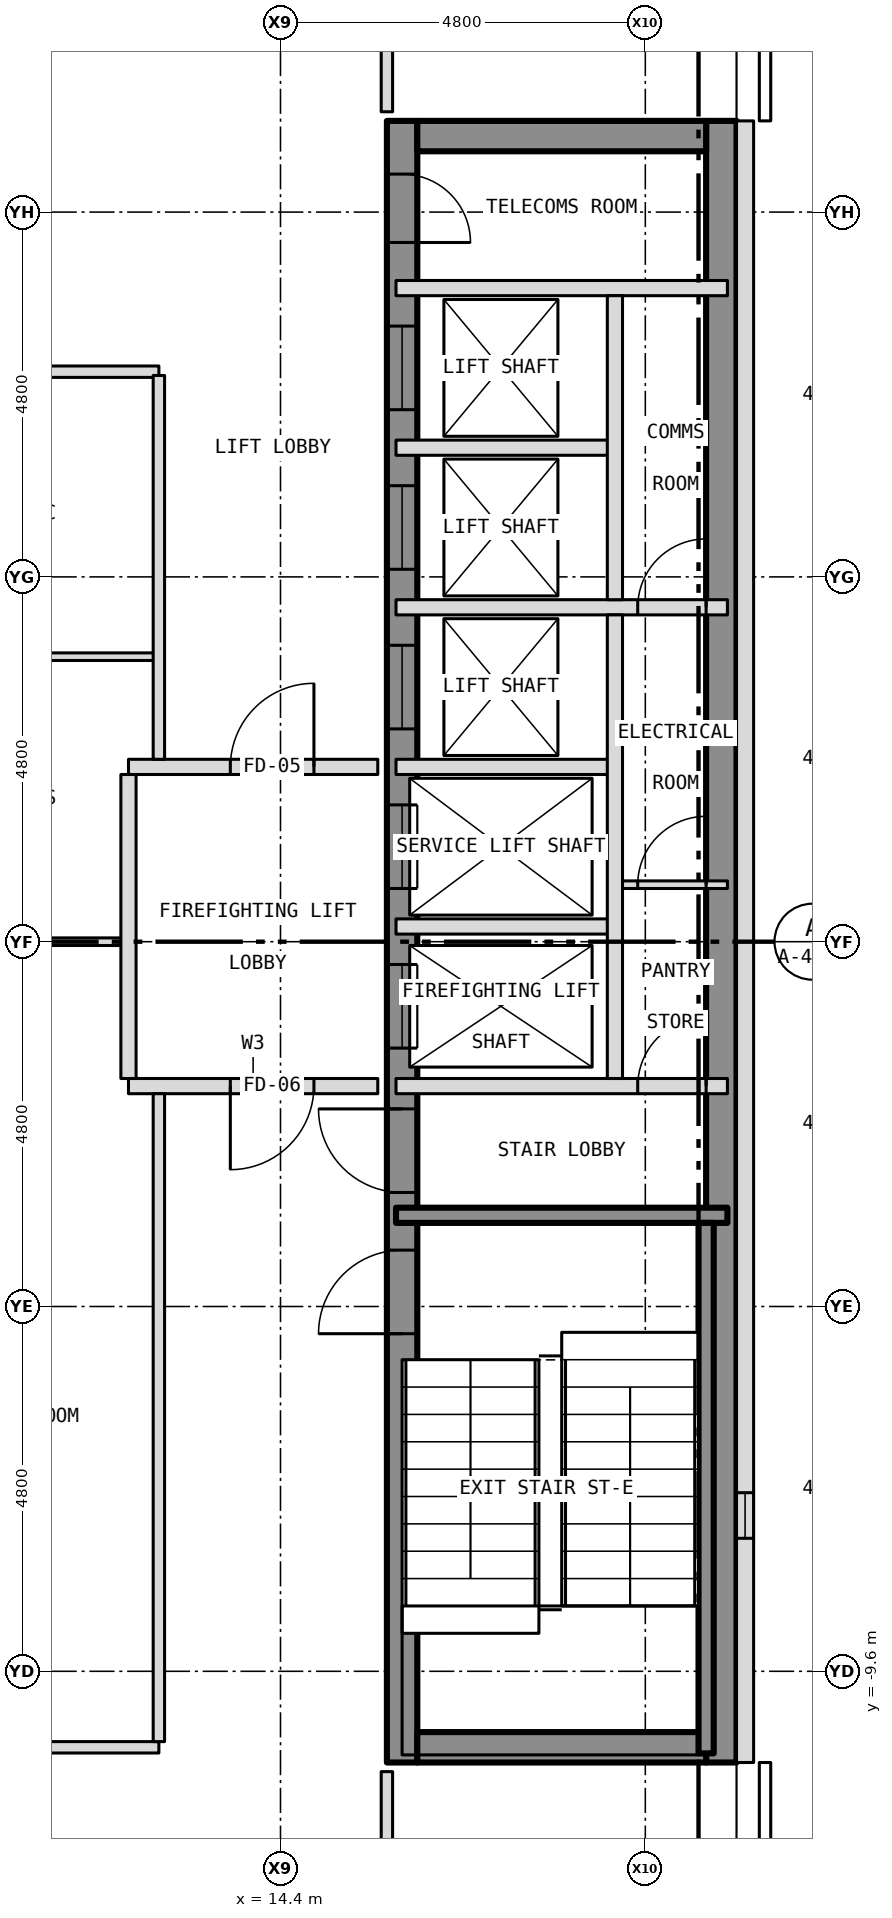
"""IFC4 building model, lengths in metres.
Left out: names, types, materials, properties, quantities, classifications, styles, units other than length and angle.
Written with IfcOpenShell. Run it as: python <this file> out.ifc"""

import sys

from ifc_helpers import new_model, si_unit, direction, frame, frame_2d, origin, place, context, subcontext, project, spatial, rectangle, extrude, element, fill, save


model = new_model("IFC4")
c1 = context("Model", 3, precision=1e-05, world=origin(), true_north=direction((0.0, 1.0)))
c2 = subcontext(c1, "Body", "Model", "MODEL_VIEW")
j1 = project(units=[si_unit("LENGTHUNIT", "METRE"), si_unit("PLANEANGLEUNIT", "RADIAN")], contexts=[c1])
p1 = place(None, origin())
s1 = spatial("IfcSite", under=j1, at=p1, CompositionType="ELEMENT")
p2 = place(p1, origin())
s2 = spatial("IfcBuilding", under=s1, at=p2, CompositionType="ELEMENT")
p3 = place(p2, frame((0.0, 0.0, 258.5)))
s3 = spatial("IfcBuildingStorey", under=s2, at=p3, CompositionType="ELEMENT", Elevation=258.5)
p4 = place(p3, frame((16.0, -10.8, 0.0), z_axis=(0.0, 0.0, 1.0), x_axis=(0.0, 1.0, 0.0)))
e1 = element("IfcWall", 1, at=p4, inside=s3, PredefinedType="SHEAR", context=c2, shape_type="SweptSolid", body=[
    extrude(rectangle(XDim=21.6, YDim=0.4, at=frame_2d((10.8, 0.0))), origin(), (0.0, 0.0, 1.0), 3.25),
])
p5 = place(p4, frame((9.4, 0.0, 0.0)))
e2 = element("IfcOpeningElement", 2, at=p5, cuts=e1, PredefinedType="OPENING", context=c2, shape_type="SweptSolid", body=[
    extrude(rectangle(XDim=1.1, YDim=2.1, at=frame_2d((0.55, 1.05))), frame((0.0, 0.212, 0.0), z_axis=(0.0, -1.0, 0.0), x_axis=(1.0, 0.0, 0.0)), (0.0, 0.0, 1.0), 0.424),
])
p6 = place(p4, frame((11.5, 0.0, 0.0)))
e3 = element("IfcOpeningElement", 3, at=p6, cuts=e1, PredefinedType="OPENING", context=c2, shape_type="SweptSolid", body=[
    extrude(rectangle(XDim=1.1, YDim=2.1, at=frame_2d((0.55, 1.05))), frame((0.0, 0.212, 0.0), z_axis=(0.0, -1.0, 0.0), x_axis=(1.0, 0.0, 0.0)), (0.0, 0.0, 1.0), 0.424),
])
p7 = place(p4, frame((13.6, 0.0, 0.0)))
e4 = element("IfcOpeningElement", 4, at=p7, cuts=e1, PredefinedType="OPENING", context=c2, shape_type="SweptSolid", body=[
    extrude(rectangle(XDim=1.1, YDim=2.1, at=frame_2d((0.55, 1.05))), frame((0.0, 0.212, 0.0), z_axis=(0.0, -1.0, 0.0), x_axis=(1.0, 0.0, 0.0)), (0.0, 0.0, 1.0), 0.424),
])
p8 = place(p4, frame((15.7, 0.0, 0.0)))
e5 = element("IfcOpeningElement", 5, at=p8, cuts=e1, PredefinedType="OPENING", context=c2, shape_type="SweptSolid", body=[
    extrude(rectangle(XDim=1.1, YDim=2.1, at=frame_2d((0.55, 1.05))), frame((0.0, 0.212, 0.0), z_axis=(0.0, -1.0, 0.0), x_axis=(1.0, 0.0, 0.0)), (0.0, 0.0, 1.0), 0.424),
])
p9 = place(p4, frame((17.8, 0.0, 0.0)))
e6 = element("IfcOpeningElement", 6, at=p9, cuts=e1, PredefinedType="OPENING", context=c2, shape_type="SweptSolid", body=[
    extrude(rectangle(XDim=1.1, YDim=2.1, at=frame_2d((0.55, 1.05))), frame((0.0, 0.212, 0.0), z_axis=(0.0, -1.0, 0.0), x_axis=(1.0, 0.0, 0.0)), (0.0, 0.0, 1.0), 0.424),
])
p10 = place(p4, frame((5.642, 0.0, 0.0)))
e7 = element("IfcOpeningElement", 7, at=p10, cuts=e1, PredefinedType="OPENING", context=c2, shape_type="SweptSolid", body=[
    extrude(rectangle(XDim=1.1, YDim=2.1, at=frame_2d((0.55, 1.05))), frame((0.0, 0.212, 0.0), z_axis=(0.0, -1.0, 0.0), x_axis=(1.0, 0.0, 0.0)), (0.0, 0.0, 1.0), 0.424),
])
p11 = place(p4, frame((7.5, 0.0, 0.0)))
e8 = element("IfcOpeningElement", 8, at=p11, cuts=e1, PredefinedType="OPENING", context=c2, shape_type="SweptSolid", body=[
    extrude(rectangle(XDim=1.1, YDim=2.1, at=frame_2d((0.55, 1.05))), frame((0.0, 0.212, 0.0), z_axis=(0.0, -1.0, 0.0), x_axis=(1.0, 0.0, 0.0)), (0.0, 0.0, 1.0), 0.424),
])
p12 = place(p4, frame((20.0, 0.0, 0.0)))
e9 = element("IfcOpeningElement", 9, at=p12, cuts=e1, PredefinedType="OPENING", context=c2, shape_type="SweptSolid", body=[
    extrude(rectangle(XDim=0.9, YDim=2.1, at=frame_2d((0.45, 1.05))), frame((0.0, 0.212, 0.0), z_axis=(0.0, -1.0, 0.0), x_axis=(1.0, 0.0, 0.0)), (0.0, 0.0, 1.0), 0.424),
])
p13 = place(p3, frame((20.2, -10.8, 0.0), z_axis=(0.0, 0.0, 1.0), x_axis=(0.0, 1.0, 0.0)))
e10 = element("IfcWall", 10, at=p13, inside=s3, PredefinedType="SHEAR", context=c2, shape_type="SweptSolid", body=[
    extrude(rectangle(XDim=21.6, YDim=0.4, at=frame_2d((10.8, 0.0))), origin(), (0.0, 0.0, 1.0), 3.25),
])
for number, where, z_axis, x_axis in (
    (11, (16.2, 10.6, 0.0), (0.0, 0.0, 1.0), (1.0, 0.0, 0.0)),
    (12, (16.2, -10.6, 0.0), (0.0, 0.0, 1.0), (1.0, 0.0, 0.0)),
):
    element("IfcWall", number, at=place(p3, frame(where, z_axis=z_axis, x_axis=x_axis)), inside=s3, PredefinedType="SHEAR", context=c2, shape_type="SweptSolid", body=[
        extrude(rectangle(XDim=3.8, YDim=0.4, at=frame_2d((1.9, 0.0))), origin(), (0.0, 0.0, 1.0), 3.25),
    ])
p14 = place(p3, frame((20.512, -10.8, 0.0), z_axis=(0.0, 0.0, 1.0), x_axis=(0.0, 1.0, 0.0)))
e13 = element("IfcWall", 13, at=p14, inside=s3, PredefinedType="SOLIDWALL", context=c2, shape_type="SweptSolid", body=[
    extrude(rectangle(XDim=21.6, YDim=0.225, at=frame_2d((10.8, 0.0))), origin(), (0.0, 0.0, 1.0), 3.5),
])
p15 = place(p14, frame((2.95, 0.0, 1.0)))
e14 = element("IfcOpeningElement", 14, at=p15, cuts=e13, PredefinedType="OPENING", context=c2, shape_type="SweptSolid", body=[
    extrude(rectangle(XDim=0.6, YDim=1.5, at=frame_2d((0.3, 0.75))), frame((0.0, 0.125, 0.0), z_axis=(0.0, -1.0, 0.0), x_axis=(1.0, 0.0, 0.0)), (0.0, 0.0, 1.0), 0.249),
])
p16 = place(p3, frame((8.1, -10.6, 0.0), z_axis=(0.0, 0.0, 1.0), x_axis=(1.0, 0.0, 0.0)))
e15 = element("IfcWall", 15, at=p16, inside=s3, PredefinedType="PARTITIONING", context=c2, shape_type="SweptSolid", body=[
    extrude(rectangle(XDim=4.7, YDim=0.15, at=frame_2d((2.35, 0.0))), origin(), (0.0, 0.0, 1.0), 3.35),
])
p17 = place(p3, frame((15.92, -3.6, 0.0), z_axis=(0.0, 0.0, 1.0), x_axis=(1.0, 0.0, 0.0)))
e16 = element("IfcWall", 16, at=p17, inside=s3, PredefinedType="SHEAR", context=c2, shape_type="SweptSolid", body=[
    extrude(rectangle(XDim=4.36, YDim=0.2, at=frame_2d((2.18, 0.0))), origin(), (0.0, 0.0, 1.0), 3.25),
])
p18 = place(p3, frame((12.4, -1.9, 0.0), z_axis=(0.0, 0.0, 1.0), x_axis=(1.0, 0.0, 0.0)))
e17 = element("IfcWall", 17, at=p18, inside=s3, PredefinedType="PARTITIONING", context=c2, shape_type="SweptSolid", body=[
    extrude(rectangle(XDim=3.28, YDim=0.2, at=frame_2d((1.64, 0.0))), origin(), (0.0, 0.0, 1.0), 3.35),
])
p19 = place(p18, frame((1.34, 0.0, 0.0)))
e18 = element("IfcOpeningElement", 18, at=p19, cuts=e17, PredefinedType="OPENING", context=c2, shape_type="SweptSolid", body=[
    extrude(rectangle(XDim=1.1, YDim=2.1, at=frame_2d((0.55, 1.05))), frame((0.0, 0.112, 0.0), z_axis=(0.0, -1.0, 0.0), x_axis=(1.0, 0.0, 0.0)), (0.0, 0.0, 1.0), 0.224),
])
p20 = place(p3, frame((15.92, -1.9, 0.0), z_axis=(0.0, 0.0, 1.0), x_axis=(1.0, 0.0, 0.0)))
e19 = element("IfcWall", 19, at=p20, inside=s3, PredefinedType="PARTITIONING", context=c2, shape_type="SweptSolid", body=[
    extrude(rectangle(XDim=4.36, YDim=0.2, at=frame_2d((2.18, 0.0))), origin(), (0.0, 0.0, 1.0), 3.25),
])
p21 = place(p20, frame((3.18, 0.0, 0.0)))
e20 = element("IfcOpeningElement", 20, at=p21, cuts=e19, PredefinedType="OPENING", context=c2, shape_type="SweptSolid", body=[
    extrude(rectangle(XDim=0.9, YDim=2.1, at=frame_2d((0.45, 1.05))), frame((0.0, 0.112, 0.0), z_axis=(0.0, -1.0, 0.0), x_axis=(1.0, 0.0, 0.0)), (0.0, 0.0, 1.0), 0.224),
])
p22 = place(p3, frame((9.784, 0.0, 0.0), z_axis=(0.0, 0.0, 1.0), x_axis=(1.0, 0.0, 0.0)))
e21 = element("IfcWall", 21, at=p22, inside=s3, PredefinedType="PARTITIONING", context=c2, shape_type="SweptSolid", body=[
    extrude(rectangle(XDim=2.616, YDim=0.1, at=frame_2d((1.308, 0.0))), origin(), (0.0, 0.0, 1.0), 2.728),
])
p23 = place(p3, frame((15.92, 0.2, 0.0), z_axis=(0.0, 0.0, 1.0), x_axis=(1.0, 0.0, 0.0)))
e22 = element("IfcWall", 22, at=p23, inside=s3, PredefinedType="PARTITIONING", context=c2, shape_type="SweptSolid", body=[
    extrude(rectangle(XDim=2.88, YDim=0.2, at=frame_2d((1.44, 0.0))), origin(), (0.0, 0.0, 1.0), 3.25),
])
p24 = place(p3, frame((18.8, 0.75, 0.0), z_axis=(0.0, 0.0, 1.0), x_axis=(1.0, 0.0, 0.0)))
e23 = element("IfcWall", 23, at=p24, inside=s3, PredefinedType="PARTITIONING", context=c2, shape_type="SweptSolid", body=[
    extrude(rectangle(XDim=1.48, YDim=0.1, at=frame_2d((0.74, 0.0))), origin(), (0.0, 0.0, 1.0), 3.25),
])
p25 = place(p24, frame((0.3, 0.0, 0.0)))
e24 = element("IfcOpeningElement", 24, at=p25, cuts=e23, PredefinedType="OPENING", context=c2, shape_type="SweptSolid", body=[
    extrude(rectangle(XDim=0.9, YDim=2.1, at=frame_2d((0.45, 1.05))), frame((0.0, 0.062, 0.0), z_axis=(0.0, -1.0, 0.0), x_axis=(1.0, 0.0, 0.0)), (0.0, 0.0, 1.0), 0.124),
])
p26 = place(p3, frame((12.4, 2.3, 0.0), z_axis=(0.0, 0.0, 1.0), x_axis=(1.0, 0.0, 0.0)))
e25 = element("IfcWall", 25, at=p26, inside=s3, PredefinedType="PARTITIONING", context=c2, shape_type="SweptSolid", body=[
    extrude(rectangle(XDim=3.28, YDim=0.2, at=frame_2d((1.64, 0.0))), origin(), (0.0, 0.0, 1.0), 3.35),
])
p27 = place(p26, frame((1.34, 0.0, 0.0)))
e26 = element("IfcOpeningElement", 26, at=p27, cuts=e25, PredefinedType="OPENING", context=c2, shape_type="SweptSolid", body=[
    extrude(rectangle(XDim=1.1, YDim=2.1, at=frame_2d((0.55, 1.05))), frame((0.0, 0.112, 0.0), z_axis=(0.0, -1.0, 0.0), x_axis=(1.0, 0.0, 0.0)), (0.0, 0.0, 1.0), 0.224),
])
p28 = place(p3, frame((15.92, 2.3, 0.0), z_axis=(0.0, 0.0, 1.0), x_axis=(1.0, 0.0, 0.0)))
e27 = element("IfcWall", 27, at=p28, inside=s3, PredefinedType="PARTITIONING", context=c2, shape_type="SweptSolid", body=[
    extrude(rectangle(XDim=2.88, YDim=0.2, at=frame_2d((1.44, 0.0))), origin(), (0.0, 0.0, 1.0), 3.25),
])
p29 = place(p3, frame((8.1, 3.75, 0.0), z_axis=(0.0, 0.0, 1.0), x_axis=(1.0, 0.0, 0.0)))
e28 = element("IfcWall", 28, at=p29, inside=s3, PredefinedType="PARTITIONING", context=c2, shape_type="SweptSolid", body=[
    extrude(rectangle(XDim=4.7, YDim=0.1, at=frame_2d((2.35, 0.0))), origin(), (0.0, 0.0, 1.0), 3.35),
])
p30 = place(p3, frame((15.92, 4.4, 0.0), z_axis=(0.0, 0.0, 1.0), x_axis=(1.0, 0.0, 0.0)))
e29 = element("IfcWall", 29, at=p30, inside=s3, PredefinedType="PARTITIONING", context=c2, shape_type="SweptSolid", body=[
    extrude(rectangle(XDim=4.36, YDim=0.2, at=frame_2d((2.18, 0.0))), origin(), (0.0, 0.0, 1.0), 3.25),
])
p31 = place(p30, frame((3.18, 0.0, 0.0)))
e30 = element("IfcOpeningElement", 30, at=p31, cuts=e29, PredefinedType="OPENING", context=c2, shape_type="SweptSolid", body=[
    extrude(rectangle(XDim=0.9, YDim=2.1, at=frame_2d((0.45, 1.05))), frame((0.0, 0.112, 0.0), z_axis=(0.0, -1.0, 0.0), x_axis=(1.0, 0.0, 0.0)), (0.0, 0.0, 1.0), 0.224),
])
p32 = place(p3, frame((15.92, 6.5, 0.0), z_axis=(0.0, 0.0, 1.0), x_axis=(1.0, 0.0, 0.0)))
e31 = element("IfcWall", 31, at=p32, inside=s3, PredefinedType="PARTITIONING", context=c2, shape_type="SweptSolid", body=[
    extrude(rectangle(XDim=2.88, YDim=0.2, at=frame_2d((1.44, 0.0))), origin(), (0.0, 0.0, 1.0), 3.25),
])
p33 = place(p3, frame((8.1, 7.5, 0.0), z_axis=(0.0, 0.0, 1.0), x_axis=(1.0, 0.0, 0.0)))
e32 = element("IfcWall", 32, at=p33, inside=s3, PredefinedType="PARTITIONING", context=c2, shape_type="SweptSolid", body=[
    extrude(rectangle(XDim=4.7, YDim=0.15, at=frame_2d((2.35, 0.0))), origin(), (0.0, 0.0, 1.0), 3.35),
])
p34 = place(p33, frame((1.9, 0.0, 0.0)))
e33 = element("IfcOpeningElement", 33, at=p34, cuts=e32, PredefinedType="OPENING", context=c2, shape_type="SweptSolid", body=[
    extrude(rectangle(XDim=0.9, YDim=2.1, at=frame_2d((0.45, 1.05))), frame((0.0, 0.087, 0.0), z_axis=(0.0, -1.0, 0.0), x_axis=(1.0, 0.0, 0.0)), (0.0, 0.0, 1.0), 0.174),
])
p35 = place(p3, frame((15.92, 8.6, 0.0), z_axis=(0.0, 0.0, 1.0), x_axis=(1.0, 0.0, 0.0)))
e34 = element("IfcWall", 34, at=p35, inside=s3, PredefinedType="PARTITIONING", context=c2, shape_type="SweptSolid", body=[
    extrude(rectangle(XDim=4.36, YDim=0.2, at=frame_2d((2.18, 0.0))), origin(), (0.0, 0.0, 1.0), 3.25),
])
p36 = place(p3, frame((12.4, -1.8, 0.0), z_axis=(0.0, 0.0, 1.0), x_axis=(0.0, 1.0, 0.0)))
e35 = element("IfcWall", 35, at=p36, inside=s3, PredefinedType="PARTITIONING", context=c2, shape_type="SweptSolid", body=[
    extrude(rectangle(XDim=4.0, YDim=0.2, at=frame_2d((2.0, 0.0))), origin(), (0.0, 0.0, 1.0), 3.35),
])
p37 = place(p3, frame((12.8, -10.525, 0.0), z_axis=(0.0, 0.0, 1.0), x_axis=(0.0, 1.0, 0.0)))
e36 = element("IfcWall", 36, at=p37, inside=s3, PredefinedType="PARTITIONING", context=c2, shape_type="SweptSolid", body=[
    extrude(rectangle(XDim=8.525, YDim=0.15, at=frame_2d((4.262, 0.0))), origin(), (0.0, 0.0, 1.0), 3.35),
])
p38 = place(p3, frame((12.8, 2.4, 0.0), z_axis=(0.0, 0.0, 1.0), x_axis=(0.0, 1.0, 0.0)))
e37 = element("IfcWall", 37, at=p38, inside=s3, PredefinedType="PARTITIONING", context=c2, shape_type="SweptSolid", body=[
    extrude(rectangle(XDim=5.05, YDim=0.15, at=frame_2d((2.525, 0.0))), origin(), (0.0, 0.0, 1.0), 3.35),
])
for number, where, z_axis, x_axis in (
    (38, (15.8, -12.725, 0.0), (0.0, 0.0, 1.0), (0.0, 1.0, 0.0)),
    (39, (15.8, 10.92, 0.0), (0.0, 0.0, 1.0), (0.0, 1.0, 0.0)),
):
    element("IfcWall", number, at=place(p3, frame(where, z_axis=z_axis, x_axis=x_axis)), inside=s3, PredefinedType="PARTITIONING", context=c2, shape_type="SweptSolid", body=[
        extrude(rectangle(XDim=1.805, YDim=0.15, at=frame_2d((0.903, 0.0))), origin(), (0.0, 0.0, 1.0), 3.35),
    ])
p39 = place(p3, frame((18.8, -1.8, 0.0), z_axis=(0.0, 0.0, 1.0), x_axis=(0.0, 1.0, 0.0)))
e40 = element("IfcWall", 40, at=p39, inside=s3, PredefinedType="PARTITIONING", context=c2, shape_type="SweptSolid", body=[
    extrude(rectangle(XDim=6.1, YDim=0.2, at=frame_2d((3.05, 0.0))), origin(), (0.0, 0.0, 1.0), 3.25),
])
p40 = place(p3, frame((18.8, 4.5, 0.0), z_axis=(0.0, 0.0, 1.0), x_axis=(0.0, 1.0, 0.0)))
e41 = element("IfcWall", 41, at=p40, inside=s3, PredefinedType="PARTITIONING", context=c2, shape_type="SweptSolid", body=[
    extrude(rectangle(XDim=4.0, YDim=0.2, at=frame_2d((2.0, 0.0))), origin(), (0.0, 0.0, 1.0), 3.25),
])
p41 = place(p3, frame((20.0, -10.68, 0.0), z_axis=(0.0, 0.0, 1.0), x_axis=(0.0, 1.0, 0.0)))
e42 = element("IfcWall", 42, at=p41, inside=s3, PredefinedType="SHEAR", context=c2, shape_type="SweptSolid", body=[
    extrude(rectangle(XDim=6.98, YDim=0.2, at=frame_2d((3.49, 0.0))), origin(), (0.0, 0.0, 1.0), 3.25),
])
p42 = place(p15, origin())
e43 = element("IfcWindow", 43, at=p42, inside=s3, PartitioningType="SINGLE_PANEL", PredefinedType="WINDOW", context=c2, shape_type="SweptSolid", body=[
    extrude(rectangle(XDim=0.6, YDim=1.5, at=frame_2d((0.3, 0.75))), frame((0.0, -0.022, 0.0), z_axis=(0.0, -1.0, 0.0), x_axis=(1.0, 0.0, 0.0)), (0.0, 0.0, 1.0), 0.06),
])
fill(e14, e43)
p43 = place(p5, origin())
e44 = element("IfcDoor", 44, at=p43, inside=s3, OperationType="SLIDING_TO_LEFT", PredefinedType="DOOR", context=c2, shape_type="SweptSolid", body=[
    extrude(rectangle(XDim=1.1, YDim=2.1, at=frame_2d((0.55, 1.05))), frame((0.0, 0.025, 0.0), z_axis=(0.0, -1.0, 0.0), x_axis=(1.0, 0.0, 0.0)), (0.0, 0.0, 1.0), 0.05),
])
fill(e2, e44)
p44 = place(p6, origin())
e45 = element("IfcDoor", 45, at=p44, inside=s3, OperationType="SLIDING_TO_LEFT", PredefinedType="DOOR", context=c2, shape_type="SweptSolid", body=[
    extrude(rectangle(XDim=1.1, YDim=2.1, at=frame_2d((0.55, 1.05))), frame((0.0, 0.025, 0.0), z_axis=(0.0, -1.0, 0.0), x_axis=(1.0, 0.0, 0.0)), (0.0, 0.0, 1.0), 0.05),
])
fill(e3, e45)
p45 = place(p7, origin())
e46 = element("IfcDoor", 46, at=p45, inside=s3, OperationType="SLIDING_TO_LEFT", PredefinedType="DOOR", context=c2, shape_type="SweptSolid", body=[
    extrude(rectangle(XDim=1.1, YDim=2.1, at=frame_2d((0.55, 1.05))), frame((0.0, 0.025, 0.0), z_axis=(0.0, -1.0, 0.0), x_axis=(1.0, 0.0, 0.0)), (0.0, 0.0, 1.0), 0.05),
])
fill(e4, e46)
p46 = place(p8, origin())
e47 = element("IfcDoor", 47, at=p46, inside=s3, OperationType="SLIDING_TO_LEFT", PredefinedType="DOOR", context=c2, shape_type="SweptSolid", body=[
    extrude(rectangle(XDim=1.1, YDim=2.1, at=frame_2d((0.55, 1.05))), frame((0.0, 0.025, 0.0), z_axis=(0.0, -1.0, 0.0), x_axis=(1.0, 0.0, 0.0)), (0.0, 0.0, 1.0), 0.05),
])
fill(e5, e47)
p47 = place(p9, origin())
e48 = element("IfcDoor", 48, at=p47, inside=s3, OperationType="SLIDING_TO_LEFT", PredefinedType="DOOR", context=c2, shape_type="SweptSolid", body=[
    extrude(rectangle(XDim=1.1, YDim=2.1, at=frame_2d((0.55, 1.05))), frame((0.0, 0.025, 0.0), z_axis=(0.0, -1.0, 0.0), x_axis=(1.0, 0.0, 0.0)), (0.0, 0.0, 1.0), 0.05),
])
fill(e6, e48)
p48 = place(p10, origin())
e49 = element("IfcDoor", 49, at=p48, inside=s3, OperationType="SINGLE_SWING_LEFT", PredefinedType="DOOR", context=c2, shape_type="SweptSolid", body=[
    extrude(rectangle(XDim=1.1, YDim=2.1, at=frame_2d((0.55, 1.05))), frame((0.0, 0.025, 0.0), z_axis=(0.0, -1.0, 0.0), x_axis=(1.0, 0.0, 0.0)), (0.0, 0.0, 1.0), 0.05),
])
fill(e7, e49)
p49 = place(p11, origin())
e50 = element("IfcDoor", 50, at=p49, inside=s3, OperationType="SINGLE_SWING_RIGHT", PredefinedType="DOOR", context=c2, shape_type="SweptSolid", body=[
    extrude(rectangle(XDim=1.1, YDim=2.1, at=frame_2d((0.55, 1.05))), frame((0.0, 0.025, 0.0), z_axis=(0.0, -1.0, 0.0), x_axis=(1.0, 0.0, 0.0)), (0.0, 0.0, 1.0), 0.05),
])
fill(e8, e50)
p50 = place(p12, origin())
e51 = element("IfcDoor", 51, at=p50, inside=s3, OperationType="SINGLE_SWING_LEFT", PredefinedType="DOOR", context=c2, shape_type="SweptSolid", body=[
    extrude(rectangle(XDim=0.9, YDim=2.1, at=frame_2d((0.45, 1.05))), frame((0.0, 0.025, 0.0), z_axis=(0.0, -1.0, 0.0), x_axis=(1.0, 0.0, 0.0)), (0.0, 0.0, 1.0), 0.05),
])
fill(e9, e51)
p51 = place(p21, origin())
e52 = element("IfcDoor", 52, at=p51, inside=s3, OperationType="SINGLE_SWING_RIGHT", PredefinedType="DOOR", context=c2, shape_type="SweptSolid", body=[
    extrude(rectangle(XDim=0.9, YDim=2.1, at=frame_2d((0.45, 1.05))), frame((0.0, 0.025, 0.0), z_axis=(0.0, -1.0, 0.0), x_axis=(1.0, 0.0, 0.0)), (0.0, 0.0, 1.0), 0.05),
])
fill(e20, e52)
p52 = place(p25, origin())
e53 = element("IfcDoor", 53, at=p52, inside=s3, OperationType="SINGLE_SWING_RIGHT", PredefinedType="DOOR", context=c2, shape_type="SweptSolid", body=[
    extrude(rectangle(XDim=0.9, YDim=2.1, at=frame_2d((0.45, 1.05))), frame((0.0, 0.025, 0.0), z_axis=(0.0, -1.0, 0.0), x_axis=(1.0, 0.0, 0.0)), (0.0, 0.0, 1.0), 0.05),
])
fill(e24, e53)
p53 = place(p31, origin())
e54 = element("IfcDoor", 54, at=p53, inside=s3, OperationType="SINGLE_SWING_RIGHT", PredefinedType="DOOR", context=c2, shape_type="SweptSolid", body=[
    extrude(rectangle(XDim=0.9, YDim=2.1, at=frame_2d((0.45, 1.05))), frame((0.0, 0.025, 0.0), z_axis=(0.0, -1.0, 0.0), x_axis=(1.0, 0.0, 0.0)), (0.0, 0.0, 1.0), 0.05),
])
fill(e30, e54)
p54 = place(p27, origin())
e55 = element("IfcDoor", 55, at=p54, inside=s3, OperationType="SINGLE_SWING_RIGHT", PredefinedType="DOOR", context=c2, shape_type="SweptSolid", body=[
    extrude(rectangle(XDim=1.1, YDim=2.1, at=frame_2d((0.55, 1.05))), frame((0.0, 0.025, 0.0), z_axis=(0.0, -1.0, 0.0), x_axis=(1.0, 0.0, 0.0)), (0.0, 0.0, 1.0), 0.05),
])
fill(e26, e55)
p55 = place(p19, origin())
e56 = element("IfcDoor", 56, at=p55, inside=s3, OperationType="SINGLE_SWING_LEFT", PredefinedType="DOOR", context=c2, shape_type="SweptSolid", body=[
    extrude(rectangle(XDim=1.1, YDim=2.1, at=frame_2d((0.55, 1.05))), frame((0.0, 0.025, 0.0), z_axis=(0.0, -1.0, 0.0), x_axis=(1.0, 0.0, 0.0)), (0.0, 0.0, 1.0), 0.05),
])
fill(e18, e56)
save(model, sys.argv[1])
